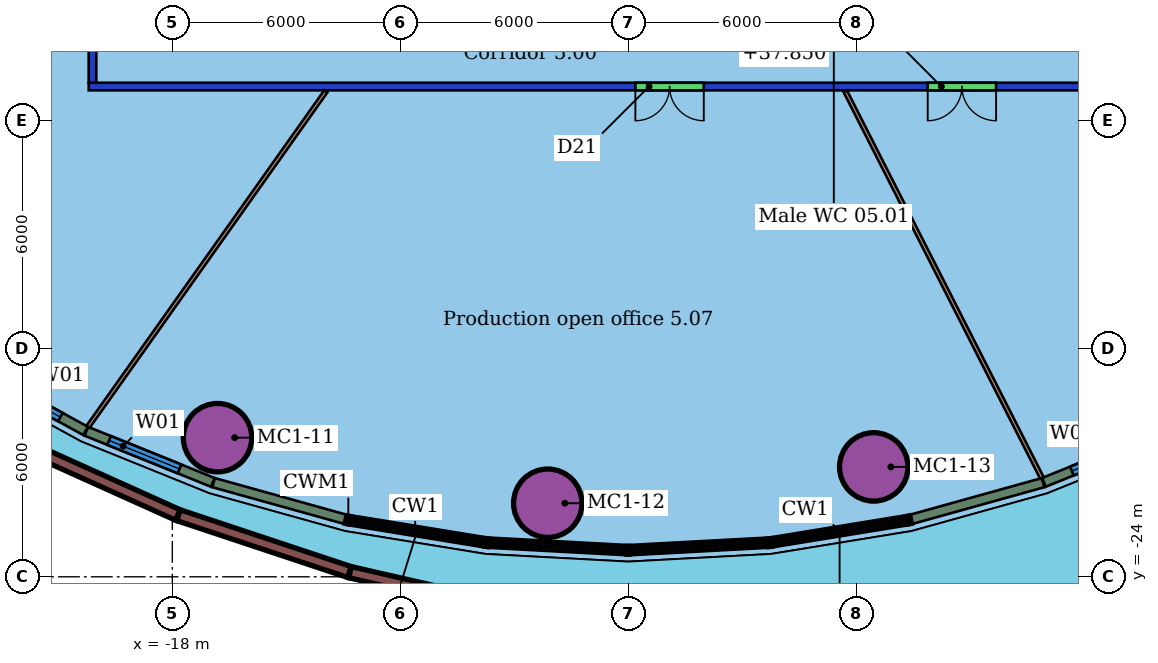
"""IFC4 building model, lengths in metres.
Left out: names, types, materials, properties, quantities, classifications, styles, units other than length and angle.
Written with IfcOpenShell. Run it as: python <this file> out.ifc"""

import sys

from ifc_helpers import new_model, si_unit, direction, frame, frame_2d, origin, origin_2d, place, context, subcontext, project, spatial, rectangle, hollow_circle, extrude, element, fill, save


model = new_model("IFC4")
c1 = context("Model", 3, precision=1e-05, world=origin(), true_north=direction((0.0, 1.0)))
c2 = subcontext(c1, "Body", "Model", "MODEL_VIEW")
j1 = project(units=[si_unit("LENGTHUNIT", "METRE"), si_unit("PLANEANGLEUNIT", "RADIAN")], contexts=[c1])
p1 = place(None, origin())
s1 = spatial("IfcSite", under=j1, at=p1, CompositionType="ELEMENT")
p2 = place(p1, origin())
s2 = spatial("IfcBuilding", under=s1, at=p2, CompositionType="ELEMENT")
p3 = place(p2, frame((0.0, 0.0, 36.0)))
s3 = spatial("IfcBuildingStorey", under=s2, at=p3, CompositionType="ELEMENT", Elevation=36.0)
for number, where, z_axis, x_axis in (
    (1, (-16.81, -20.339, 0.0), (0.0, 0.0, 1.0), (1.0, 0.0, 0.0)),
    (2, (-8.121, -22.064, 0.0), (0.0, 0.0, 1.0), (1.0, 0.0, 0.0)),
    (3, (0.458, -21.108, 0.0), (0.0, 0.0, 1.0), (1.0, 0.0, 0.0)),
):
    element("IfcColumn", number, at=place(p3, frame(where, z_axis=z_axis, x_axis=x_axis)), inside=s3, PredefinedType="COLUMN", context=c2, shape_type="SweptSolid", body=[
        extrude(hollow_circle(Radius=0.9, WallThickness=0.06, at=origin_2d()), origin(), (0.0, 0.0, 1.0), 3.55),
    ])
p4 = place(p3, frame((8.2, -11.1, 0.0), z_axis=(0.0, 0.0, 1.0), x_axis=(-1.0, 0.0, 0.0)))
e4 = element("IfcWall", 4, at=p4, inside=s3, PredefinedType="PARTITIONING", context=c2, shape_type="SweptSolid", body=[
    extrude(rectangle(XDim=28.4, YDim=0.2, at=frame_2d((14.2, 0.0))), origin(), (0.0, 0.0, 1.0), 2.85),
])
p5 = place(p4, frame((12.215, 0.0, 0.0)))
e5 = element("IfcOpeningElement", 5, at=p5, cuts=e4, PredefinedType="OPENING", context=c2, shape_type="SweptSolid", body=[
    extrude(rectangle(XDim=1.8, YDim=2.1, at=frame_2d((0.9, 1.05))), frame((0.0, 0.11, 0.0), z_axis=(0.0, -1.0, 0.0), x_axis=(1.0, 0.0, 0.0)), (0.0, 0.0, 1.0), 0.22),
])
p6 = place(p4, frame((4.522, 0.0, 0.0)))
e6 = element("IfcOpeningElement", 6, at=p6, cuts=e4, PredefinedType="OPENING", context=c2, shape_type="SweptSolid", body=[
    extrude(rectangle(XDim=1.8, YDim=2.1, at=frame_2d((0.9, 1.05))), frame((0.0, 0.11, 0.0), z_axis=(0.0, -1.0, 0.0), x_axis=(1.0, 0.0, 0.0)), (0.0, 0.0, 1.0), 0.22),
])
p7 = place(p3, frame((-20.1, -11.0, 0.0), z_axis=(0.0, 0.0, 1.0), x_axis=(0.0, 1.0, 0.0)))
e7 = element("IfcWall", 7, at=p7, inside=s3, PredefinedType="PARTITIONING", context=c2, shape_type="SweptSolid", body=[
    extrude(rectangle(XDim=22.0, YDim=0.2, at=frame_2d((11.0, 0.0))), origin(), (0.0, 0.0, 1.0), 2.85),
])
p8 = place(p7, frame((13.38, 0.0, 0.0)))
e8 = element("IfcOpeningElement", 8, at=p8, cuts=e7, PredefinedType="OPENING", context=c2, shape_type="SweptSolid", body=[
    extrude(rectangle(XDim=1.1, YDim=2.1, at=frame_2d((0.55, 1.05))), frame((0.0, 0.11, 0.0), z_axis=(0.0, -1.0, 0.0), x_axis=(1.0, 0.0, 0.0)), (0.0, 0.0, 1.0), 0.22),
])
p9 = place(p7, frame((6.18, 0.0, 0.0)))
e9 = element("IfcOpeningElement", 9, at=p9, cuts=e7, PredefinedType="OPENING", context=c2, shape_type="SweptSolid", body=[
    extrude(rectangle(XDim=1.8, YDim=2.1, at=frame_2d((0.9, 1.05))), frame((0.0, 0.11, 0.0), z_axis=(0.0, -1.0, 0.0), x_axis=(1.0, 0.0, 0.0)), (0.0, 0.0, 1.0), 0.22),
])
p10 = place(p3, frame((-20.218, -20.054, 0.0), z_axis=(0.0, 0.0, 1.0), x_axis=(0.578391097438, 0.815759608221, 0.0)))
e10 = element("IfcWall", 10, at=p10, inside=s3, PredefinedType="PARTITIONING", context=c2, shape_type="SweptSolid", body=[
    extrude(rectangle(XDim=10.818, YDim=0.1, at=frame_2d((5.409, 0.0))), origin(), (0.0, 0.0, 1.0), 3.55),
])
p11 = place(p3, frame((4.885, -21.401, 0.0), z_axis=(0.0, 0.0, 1.0), x_axis=(-0.453334779339, 0.89134032661, 0.0)))
e11 = element("IfcWall", 11, at=p11, inside=s3, PredefinedType="PARTITIONING", context=c2, shape_type="SweptSolid", body=[
    extrude(rectangle(XDim=11.419, YDim=0.1, at=frame_2d((5.709, 0.0))), origin(), (0.0, 0.0, 1.0), 3.55),
])
p12 = place(p3, frame((-23.362, -18.475, 0.0), z_axis=(0.0, 0.0, 1.0), x_axis=(0.8771213679, -0.480268785134, 0.0)))
e12 = element("IfcWall", 12, at=p12, inside=s3, PredefinedType="SOLIDWALL", context=c2, shape_type="SweptSolid", body=[
    extrude(rectangle(XDim=3.512, YDim=0.25, at=frame_2d((1.756, 0.0))), origin(), (0.0, 0.0, 1.0), 3.15),
])
p13 = place(p12, frame((0.756, 0.0, 0.8)))
e13 = element("IfcOpeningElement", 13, at=p13, cuts=e12, PredefinedType="OPENING", context=c2, shape_type="SweptSolid", body=[
    extrude(rectangle(XDim=2.0, YDim=2.2, at=frame_2d((1.0, 1.1))), frame((0.0, 0.135, 0.0), z_axis=(0.0, -1.0, 0.0), x_axis=(1.0, 0.0, 0.0)), (0.0, 0.0, 1.0), 0.27),
])
p14 = place(p3, frame((-20.261, -20.171, 0.0), z_axis=(0.0, 0.0, 1.0), x_axis=(0.927147291409, -0.374697077694, 0.0)))
e14 = element("IfcWall", 14, at=p14, inside=s3, PredefinedType="SOLIDWALL", context=c2, shape_type="SweptSolid", body=[
    extrude(rectangle(XDim=3.588, YDim=0.25, at=frame_2d((1.794, 0.0))), origin(), (0.0, 0.0, 1.0), 3.15),
])
p15 = place(p14, frame((0.644, 0.0, 0.8)))
e15 = element("IfcOpeningElement", 15, at=p15, cuts=e14, PredefinedType="OPENING", context=c2, shape_type="SweptSolid", body=[
    extrude(rectangle(XDim=2.0, YDim=2.2, at=frame_2d((1.0, 1.1))), frame((0.0, 0.135, 0.0), z_axis=(0.0, -1.0, 0.0), x_axis=(1.0, 0.0, 0.0)), (0.0, 0.0, 1.0), 0.27),
])
for number, where, z_axis, x_axis in (
    (16, (-16.914, -21.522, 0.0), (0.0, 0.0, 1.0), (0.963, -0.268, 0.0)),
    (17, (1.443, -22.488, 0.0), (0.0, 0.0, 1.0), (0.963, 0.268, 0.0)),
):
    element("IfcWall", number, at=place(p3, frame(where, z_axis=z_axis, x_axis=x_axis)), inside=s3, PredefinedType="SOLIDWALL", context=c2, shape_type="SweptSolid", body=[
        extrude(rectangle(XDim=3.604, YDim=0.25, at=frame_2d((1.802, 0.0))), origin(), (0.0, 0.0, 1.0), 3.15),
    ])
p16 = place(p3, frame((4.935, -21.515, 0.0), z_axis=(0.0, 0.0, 1.0), x_axis=(0.927147291409, 0.374697077694, 0.0)))
e18 = element("IfcWall", 18, at=p16, inside=s3, PredefinedType="SOLIDWALL", context=c2, shape_type="SweptSolid", body=[
    extrude(rectangle(XDim=3.588, YDim=0.25, at=frame_2d((1.794, 0.0))), origin(), (0.0, 0.0, 1.0), 3.15),
])
p17 = place(p16, frame((0.794, 0.0, 0.8)))
e19 = element("IfcOpeningElement", 19, at=p17, cuts=e18, PredefinedType="OPENING", context=c2, shape_type="SweptSolid", body=[
    extrude(rectangle(XDim=2.0, YDim=2.2, at=frame_2d((1.0, 1.1))), frame((0.0, 0.135, 0.0), z_axis=(0.0, -1.0, 0.0), x_axis=(1.0, 0.0, 0.0)), (0.0, 0.0, 1.0), 0.27),
])
p18 = place(p3, frame((-22.022, -20.498, 0.0), z_axis=(0.0, 0.0, 1.0), x_axis=(0.911912513487, -0.410384658274, 0.0)))
e20 = element("IfcWall", 20, at=p18, inside=s3, PredefinedType="PARAPET", context=c2, shape_type="SweptSolid", body=[
    extrude(rectangle(XDim=4.573, YDim=0.3, at=frame_2d((2.286, 0.0))), origin(), (0.0, 0.0, 1.0), 1.1),
])
p19 = place(p3, frame((-17.839, -22.379, 0.0), z_axis=(0.0, 0.0, 1.0), x_axis=(0.949007114017, -0.315254655071, 0.0)))
e21 = element("IfcWall", 21, at=p19, inside=s3, PredefinedType="PARAPET", context=c2, shape_type="SweptSolid", body=[
    extrude(rectangle(XDim=4.743, YDim=0.3, at=frame_2d((2.371, 0.0))), origin(), (0.0, 0.0, 1.0), 1.1),
])
p20 = place(p3, frame((-13.325, -23.878, 0.0), z_axis=(0.0, 0.0, 1.0), x_axis=(0.974849806662, -0.222862860186, 0.0)))
e22 = element("IfcWall", 22, at=p20, inside=s3, PredefinedType="PARAPET", context=c2, shape_type="SweptSolid", body=[
    extrude(rectangle(XDim=4.877, YDim=0.3, at=frame_2d((2.438, 0.0))), origin(), (0.0, 0.0, 1.0), 1.1),
])
p21 = place(p5, origin())
e23 = element("IfcDoor", 23, at=p21, inside=s3, OperationType="DOUBLE_DOOR_SINGLE_SWING", PredefinedType="DOOR", context=c2, shape_type="SweptSolid", body=[
    extrude(rectangle(XDim=1.8, YDim=2.1, at=frame_2d((0.9, 1.05))), frame((0.0, 0.025, 0.0), z_axis=(0.0, -1.0, 0.0), x_axis=(1.0, 0.0, 0.0)), (0.0, 0.0, 1.0), 0.05),
])
fill(e5, e23)
p22 = place(p6, origin())
e24 = element("IfcDoor", 24, at=p22, inside=s3, OperationType="DOUBLE_DOOR_SINGLE_SWING", PredefinedType="DOOR", context=c2, shape_type="SweptSolid", body=[
    extrude(rectangle(XDim=1.8, YDim=2.1, at=frame_2d((0.9, 1.05))), frame((0.0, 0.025, 0.0), z_axis=(0.0, -1.0, 0.0), x_axis=(1.0, 0.0, 0.0)), (0.0, 0.0, 1.0), 0.05),
])
fill(e6, e24)
p23 = place(p13, origin())
e25 = element("IfcWindow", 25, at=p23, inside=s3, PartitioningType="SINGLE_PANEL", PredefinedType="WINDOW", context=c2, shape_type="SweptSolid", body=[
    extrude(rectangle(XDim=2.0, YDim=2.2, at=frame_2d((1.0, 1.1))), frame((0.0, 0.03, 0.0), z_axis=(0.0, -1.0, 0.0), x_axis=(1.0, 0.0, 0.0)), (0.0, 0.0, 1.0), 0.06),
])
fill(e13, e25)
p24 = place(p15, origin())
e26 = element("IfcWindow", 26, at=p24, inside=s3, PartitioningType="SINGLE_PANEL", PredefinedType="WINDOW", context=c2, shape_type="SweptSolid", body=[
    extrude(rectangle(XDim=2.0, YDim=2.2, at=frame_2d((1.0, 1.1))), frame((0.0, 0.03, 0.0), z_axis=(0.0, -1.0, 0.0), x_axis=(1.0, 0.0, 0.0)), (0.0, 0.0, 1.0), 0.06),
])
fill(e15, e26)
p25 = place(p17, origin())
e27 = element("IfcWindow", 27, at=p25, inside=s3, PartitioningType="SINGLE_PANEL", PredefinedType="WINDOW", context=c2, shape_type="SweptSolid", body=[
    extrude(rectangle(XDim=2.0, YDim=2.2, at=frame_2d((1.0, 1.1))), frame((0.0, 0.03, 0.0), z_axis=(0.0, -1.0, 0.0), x_axis=(1.0, 0.0, 0.0)), (0.0, 0.0, 1.0), 0.06),
])
fill(e19, e27)
save(model, sys.argv[1])
